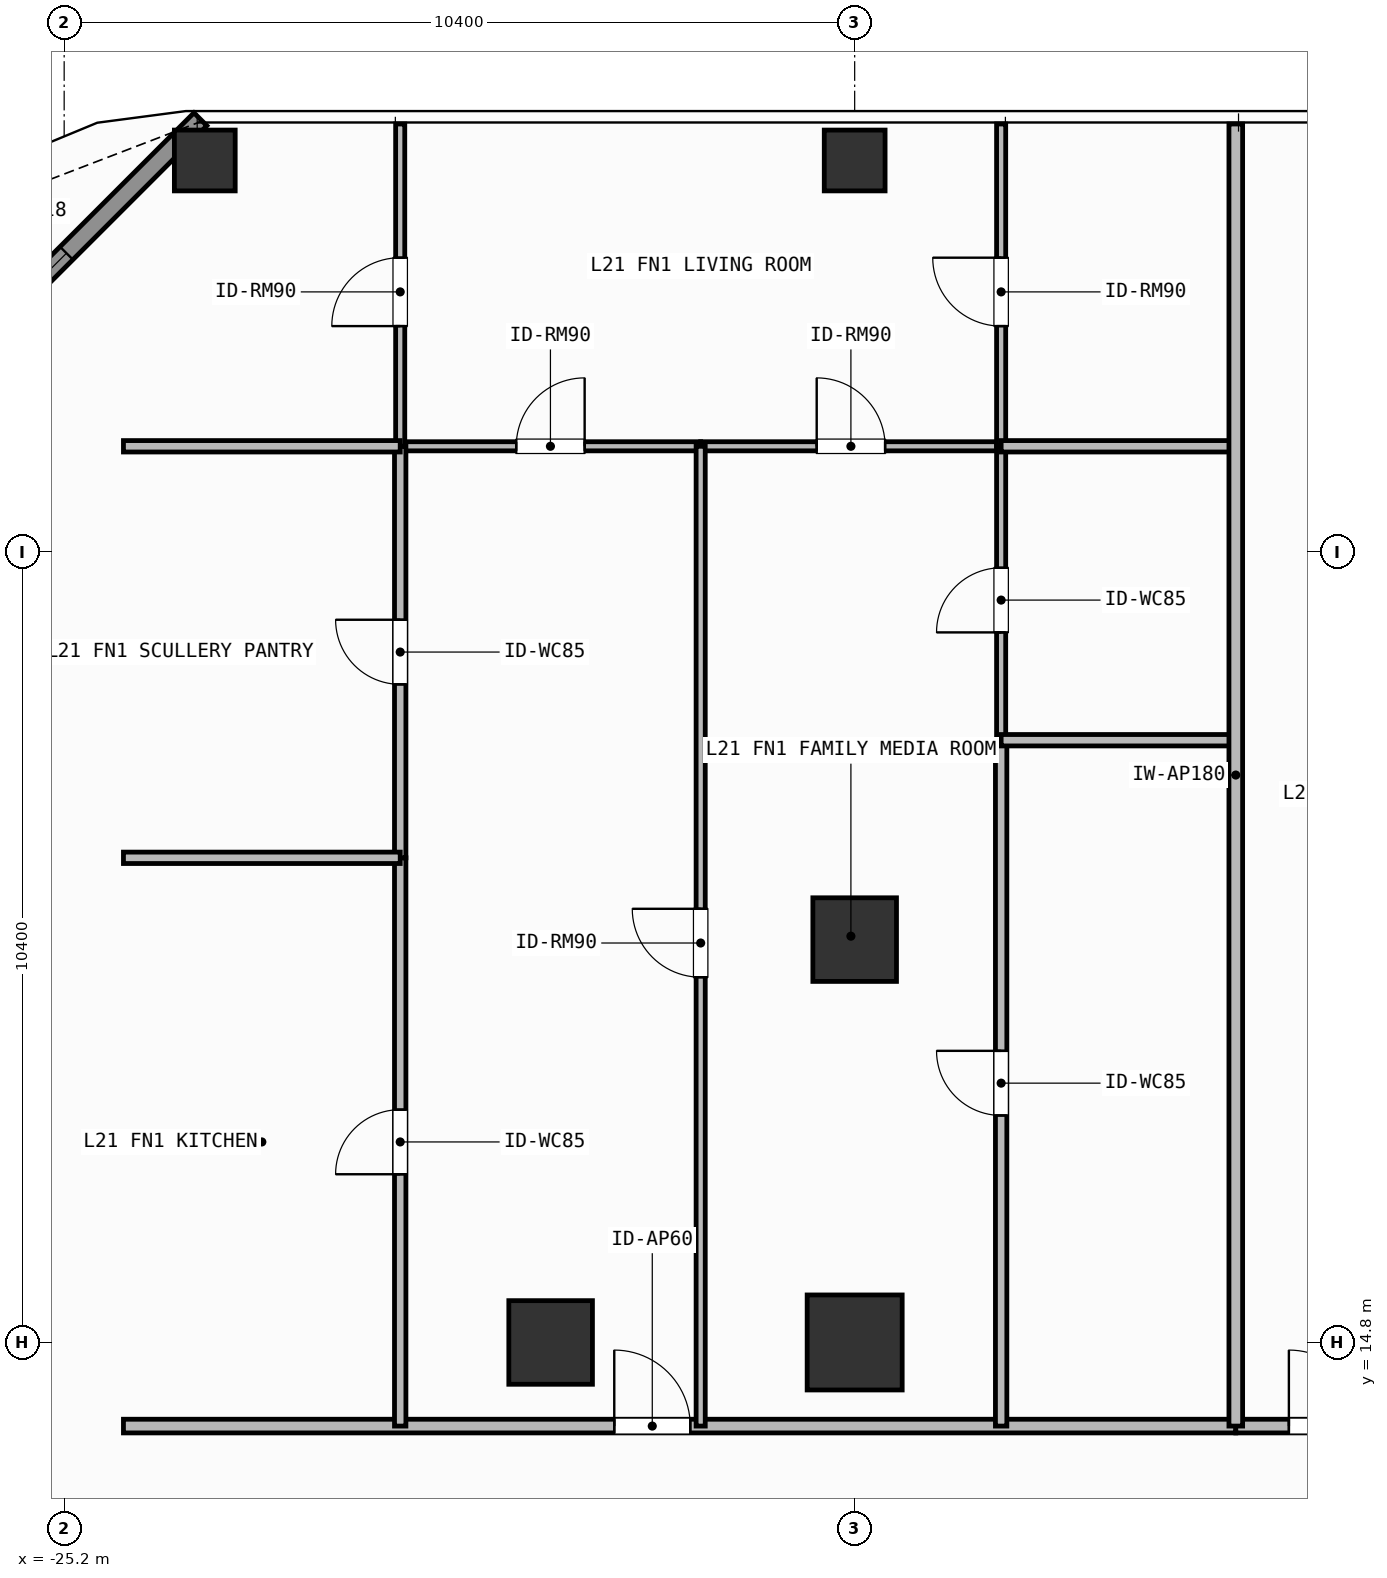
"""IFC4 building model, lengths in metres.
Left out: names, types, materials, properties, quantities, classifications, styles, units other than length and angle.
Written with IfcOpenShell. Run it as: python <this file> out.ifc"""

import sys

from ifc_helpers import new_model, si_unit, direction, frame, frame_2d, origin, origin_2d, place, context, subcontext, project, spatial, rectangle, hollow_rectangle, extrude, element, fill, save


model = new_model("IFC4")
c1 = context("Model", 3, precision=1e-05, world=origin(), true_north=direction((0.0, 1.0)))
c2 = subcontext(c1, "Body", "Model", "MODEL_VIEW")
j1 = project(units=[si_unit("LENGTHUNIT", "METRE"), si_unit("PLANEANGLEUNIT", "RADIAN")], contexts=[c1])
p1 = place(None, origin())
s1 = spatial("IfcSite", under=j1, at=p1, CompositionType="ELEMENT")
p2 = place(p1, origin())
s2 = spatial("IfcBuilding", under=s1, at=p2, CompositionType="ELEMENT")
p3 = place(p2, frame((0.0, 0.0, 85.2)))
s3 = spatial("IfcBuildingStorey", under=s2, at=p3, CompositionType="ELEMENT", Elevation=85.2)
p4 = place(p3, frame((-14.8, 14.8, 0.0), z_axis=(0.0, 0.0, 1.0), x_axis=(1.0, 0.0, 0.0)))
e1 = element("IfcColumn", 1, at=p4, inside=s3, PredefinedType="COLUMN", context=c2, shape_type="SweptSolid", body=[
    extrude(rectangle(XDim=1.25, YDim=1.25, at=origin_2d()), origin(), (0.0, 0.0, 1.0), 3.9),
])
for number, where, z_axis, x_axis in (
    (2, (-18.8, 14.8, 0.0), (0.0, 0.0, 1.0), (1.0, 0.0, 0.0)),
    (3, (-14.8, 20.1, 0.0), (0.0, 0.0, 1.0), (1.0, 0.0, 0.0)),
):
    element("IfcColumn", number, at=place(p3, frame(where, z_axis=z_axis, x_axis=x_axis)), inside=s3, PredefinedType="COLUMN", context=c2, shape_type="SweptSolid", body=[
        extrude(rectangle(XDim=1.1, YDim=1.1, at=origin_2d()), origin(), (0.0, 0.0, 1.0), 3.9),
    ])
for number, where, z_axis, x_axis in (
    (4, (-23.35, 30.35, 0.0), (0.0, 0.0, 1.0), (1.0, 0.0, 0.0)),
    (5, (-14.8, 30.35, 0.0), (0.0, 0.0, 1.0), (1.0, 0.0, 0.0)),
):
    element("IfcColumn", number, at=place(p3, frame(where, z_axis=z_axis, x_axis=x_axis)), inside=s3, PredefinedType="COLUMN", context=c2, shape_type="SweptSolid", body=[
        extrude(hollow_rectangle(XDim=0.8, YDim=0.8, WallThickness=0.036, at=origin_2d()), origin(), (0.0, 0.0, 1.0), 3.9),
    ])
p5 = place(p3, frame((-27.992, 26.308, 0.0), z_axis=(0.0, 0.0, 1.0), x_axis=(0.707106781187, 0.707106781187, 0.0)))
e6 = element("IfcWall", 6, at=p5, inside=s3, PredefinedType="SOLIDWALL", context=c2, shape_type="SweptSolid", body=[
    extrude(rectangle(XDim=6.484, YDim=0.24, at=frame_2d((3.242, 0.0))), origin(), (0.0, 0.0, 1.0), 3.68),
])
p6 = place(p5, frame((2.492, 0.0, 0.8)))
e7 = element("IfcOpeningElement", 7, at=p6, cuts=e6, PredefinedType="OPENING", context=c2, shape_type="SweptSolid", body=[
    extrude(rectangle(XDim=1.5, YDim=1.85, at=frame_2d((0.75, 0.925))), frame((0.0, 0.13, 0.0), z_axis=(0.0, -1.0, 0.0), x_axis=(1.0, 0.0, 0.0)), (0.0, 0.0, 1.0), 0.26),
])
p7 = place(p3, frame((-24.42, 13.7, 0.0), z_axis=(0.0, 0.0, 1.0), x_axis=(1.0, 0.0, 0.0)))
e8 = element("IfcWall", 8, at=p7, inside=s3, PredefinedType="PARTITIONING", context=c2, shape_type="SweptSolid", body=[
    extrude(rectangle(XDim=14.634, YDim=0.18, at=frame_2d((7.317, 0.0))), origin(), (0.0, 0.0, 1.0), 3.68),
])
p8 = place(p7, frame((6.457, 0.0, 0.0)))
e9 = element("IfcOpeningElement", 9, at=p8, cuts=e8, PredefinedType="OPENING", context=c2, shape_type="SweptSolid", body=[
    extrude(rectangle(XDim=1.0, YDim=2.2, at=frame_2d((0.5, 1.1))), frame((0.0, 0.1, 0.0), z_axis=(0.0, -1.0, 0.0), x_axis=(1.0, 0.0, 0.0)), (0.0, 0.0, 1.0), 0.2),
])
p9 = place(p3, frame((-20.779, 26.59, 0.0), z_axis=(0.0, 0.0, 1.0), x_axis=(1.0, 0.0, 0.0)))
e10 = element("IfcWall", 10, at=p9, inside=s3, PredefinedType="PARTITIONING", context=c2, shape_type="SweptSolid", body=[
    extrude(rectangle(XDim=3.953, YDim=0.12, at=frame_2d((1.977, 0.0))), origin(), (0.0, 0.0, 1.0), 3.68),
])
p10 = place(p9, frame((1.527, 0.0, 0.0)))
e11 = element("IfcOpeningElement", 11, at=p10, cuts=e10, PredefinedType="OPENING", context=c2, shape_type="SweptSolid", body=[
    extrude(rectangle(XDim=0.9, YDim=2.1, at=frame_2d((0.45, 1.05))), frame((0.0, 0.07, 0.0), z_axis=(0.0, -1.0, 0.0), x_axis=(1.0, 0.0, 0.0)), (0.0, 0.0, 1.0), 0.14),
])
p11 = place(p3, frame((-16.826, 26.59, 0.0), z_axis=(0.0, 0.0, 1.0), x_axis=(1.0, 0.0, 0.0)))
e12 = element("IfcWall", 12, at=p11, inside=s3, PredefinedType="PARTITIONING", context=c2, shape_type="SweptSolid", body=[
    extrude(rectangle(XDim=3.953, YDim=0.12, at=frame_2d((1.977, 0.0))), origin(), (0.0, 0.0, 1.0), 3.68),
])
p12 = place(p11, frame((1.527, 0.0, 0.0)))
e13 = element("IfcOpeningElement", 13, at=p12, cuts=e12, PredefinedType="OPENING", context=c2, shape_type="SweptSolid", body=[
    extrude(rectangle(XDim=0.9, YDim=2.1, at=frame_2d((0.45, 1.05))), frame((0.0, 0.07, 0.0), z_axis=(0.0, -1.0, 0.0), x_axis=(1.0, 0.0, 0.0)), (0.0, 0.0, 1.0), 0.14),
])
p13 = place(p3, frame((-16.826, 13.7, 0.0), z_axis=(0.0, 0.0, 1.0), x_axis=(0.0, 1.0, 0.0)))
e14 = element("IfcWall", 14, at=p13, inside=s3, PredefinedType="PARTITIONING", context=c2, shape_type="SweptSolid", body=[
    extrude(rectangle(XDim=12.89, YDim=0.12, at=frame_2d((6.445, 0.0))), origin(), (0.0, 0.0, 1.0), 3.68),
])
p14 = place(p13, frame((5.905, 0.0, 0.0)))
e15 = element("IfcOpeningElement", 15, at=p14, cuts=e14, PredefinedType="OPENING", context=c2, shape_type="SweptSolid", body=[
    extrude(rectangle(XDim=0.9, YDim=2.1, at=frame_2d((0.45, 1.05))), frame((0.0, 0.07, 0.0), z_axis=(0.0, -1.0, 0.0), x_axis=(1.0, 0.0, 0.0)), (0.0, 0.0, 1.0), 0.14),
])
p15 = place(p3, frame((-20.779, 13.7, 0.0), z_axis=(0.0, 0.0, 1.0), x_axis=(0.0, 1.0, 0.0)))
e16 = element("IfcWall", 16, at=p15, inside=s3, PredefinedType="PARTITIONING", context=c2, shape_type="SweptSolid", body=[
    extrude(rectangle(XDim=7.476, YDim=0.15, at=frame_2d((3.738, 0.0))), origin(), (0.0, 0.0, 1.0), 3.68),
])
p16 = place(p15, frame((3.313, 0.0, 0.0)))
e17 = element("IfcOpeningElement", 17, at=p16, cuts=e16, PredefinedType="OPENING", context=c2, shape_type="SweptSolid", body=[
    extrude(rectangle(XDim=0.85, YDim=2.1, at=frame_2d((0.425, 1.05))), frame((0.0, 0.085, 0.0), z_axis=(0.0, -1.0, 0.0), x_axis=(1.0, 0.0, 0.0)), (0.0, 0.0, 1.0), 0.17),
])
p17 = place(p3, frame((-20.779, 21.176, 0.0), z_axis=(0.0, 0.0, 1.0), x_axis=(0.0, 1.0, 0.0)))
e18 = element("IfcWall", 18, at=p17, inside=s3, PredefinedType="PARTITIONING", context=c2, shape_type="SweptSolid", body=[
    extrude(rectangle(XDim=5.414, YDim=0.15, at=frame_2d((2.707, 0.0))), origin(), (0.0, 0.0, 1.0), 3.68),
])
p18 = place(p17, frame((2.282, 0.0, 0.0)))
e19 = element("IfcOpeningElement", 19, at=p18, cuts=e18, PredefinedType="OPENING", context=c2, shape_type="SweptSolid", body=[
    extrude(rectangle(XDim=0.85, YDim=2.1, at=frame_2d((0.425, 1.05))), frame((0.0, 0.085, 0.0), z_axis=(0.0, -1.0, 0.0), x_axis=(1.0, 0.0, 0.0)), (0.0, 0.0, 1.0), 0.17),
])
p19 = place(p3, frame((-20.779, 26.59, 0.0), z_axis=(0.0, 0.0, 1.0), x_axis=(0.0, 1.0, 0.0)))
e20 = element("IfcWall", 20, at=p19, inside=s3, PredefinedType="PARTITIONING", context=c2, shape_type="SweptSolid", body=[
    extrude(rectangle(XDim=4.24, YDim=0.12, at=frame_2d((2.12, 0.0))), origin(), (0.0, 0.0, 1.0), 3.68),
])
p20 = place(p19, frame((1.581, 0.0, 0.0)))
e21 = element("IfcOpeningElement", 21, at=p20, cuts=e20, PredefinedType="OPENING", context=c2, shape_type="SweptSolid", body=[
    extrude(rectangle(XDim=0.9, YDim=2.1, at=frame_2d((0.45, 1.05))), frame((0.0, 0.07, 0.0), z_axis=(0.0, -1.0, 0.0), x_axis=(1.0, 0.0, 0.0)), (0.0, 0.0, 1.0), 0.14),
])
p21 = place(p3, frame((-12.873, 13.7, 0.0), z_axis=(0.0, 0.0, 1.0), x_axis=(0.0, 1.0, 0.0)))
e22 = element("IfcWall", 22, at=p21, inside=s3, PredefinedType="PARTITIONING", context=c2, shape_type="SweptSolid", body=[
    extrude(rectangle(XDim=9.023, YDim=0.15, at=frame_2d((4.511, 0.0))), origin(), (0.0, 0.0, 1.0), 3.68),
])
p22 = place(p21, frame((4.086, 0.0, 0.0)))
e23 = element("IfcOpeningElement", 23, at=p22, cuts=e22, PredefinedType="OPENING", context=c2, shape_type="SweptSolid", body=[
    extrude(rectangle(XDim=0.85, YDim=2.1, at=frame_2d((0.425, 1.05))), frame((0.0, 0.085, 0.0), z_axis=(0.0, -1.0, 0.0), x_axis=(1.0, 0.0, 0.0)), (0.0, 0.0, 1.0), 0.17),
])
p23 = place(p3, frame((-12.873, 22.723, 0.0), z_axis=(0.0, 0.0, 1.0), x_axis=(0.0, 1.0, 0.0)))
e24 = element("IfcWall", 24, at=p23, inside=s3, PredefinedType="PARTITIONING", context=c2, shape_type="SweptSolid", body=[
    extrude(rectangle(XDim=3.867, YDim=0.12, at=frame_2d((1.934, 0.0))), origin(), (0.0, 0.0, 1.0), 3.68),
])
p24 = place(p23, frame((1.419, 0.0, 0.0)))
e25 = element("IfcOpeningElement", 25, at=p24, cuts=e24, PredefinedType="OPENING", context=c2, shape_type="SweptSolid", body=[
    extrude(rectangle(XDim=0.85, YDim=2.1, at=frame_2d((0.425, 1.05))), frame((0.0, 0.07, 0.0), z_axis=(0.0, -1.0, 0.0), x_axis=(1.0, 0.0, 0.0)), (0.0, 0.0, 1.0), 0.14),
])
p25 = place(p3, frame((-12.873, 26.59, 0.0), z_axis=(0.0, 0.0, 1.0), x_axis=(0.0, 1.0, 0.0)))
e26 = element("IfcWall", 26, at=p25, inside=s3, PredefinedType="PARTITIONING", context=c2, shape_type="SweptSolid", body=[
    extrude(rectangle(XDim=4.24, YDim=0.12, at=frame_2d((2.12, 0.0))), origin(), (0.0, 0.0, 1.0), 3.68),
])
p26 = place(p25, frame((1.581, 0.0, 0.0)))
e27 = element("IfcOpeningElement", 27, at=p26, cuts=e26, PredefinedType="OPENING", context=c2, shape_type="SweptSolid", body=[
    extrude(rectangle(XDim=0.9, YDim=2.1, at=frame_2d((0.45, 1.05))), frame((0.0, 0.07, 0.0), z_axis=(0.0, -1.0, 0.0), x_axis=(1.0, 0.0, 0.0)), (0.0, 0.0, 1.0), 0.14),
])
p27 = place(p3, frame((-9.786, 13.7, 0.0), z_axis=(0.0, 0.0, 1.0), x_axis=(1.0, 0.0, 0.0)))
e28 = element("IfcWall", 28, at=p27, inside=s3, PredefinedType="PARTITIONING", context=c2, shape_type="SweptSolid", body=[
    extrude(rectangle(XDim=6.886, YDim=0.18, at=frame_2d((3.443, 0.0))), origin(), (0.0, 0.0, 1.0), 3.68),
])
p28 = place(p27, frame((0.698, 0.0, 0.0)))
e29 = element("IfcOpeningElement", 29, at=p28, cuts=e28, PredefinedType="OPENING", context=c2, shape_type="SweptSolid", body=[
    extrude(rectangle(XDim=1.0, YDim=2.2, at=frame_2d((0.5, 1.1))), frame((0.0, 0.1, 0.0), z_axis=(0.0, -1.0, 0.0), x_axis=(1.0, 0.0, 0.0)), (0.0, 0.0, 1.0), 0.2),
])
for number, where, z_axis, x_axis in (
    (30, (-24.42, 21.176, 0.0), (0.0, 0.0, 1.0), (1.0, 0.0, 0.0)),
    (31, (-24.42, 26.59, 0.0), (0.0, 0.0, 1.0), (1.0, 0.0, 0.0)),
):
    element("IfcWall", number, at=place(p3, frame(where, z_axis=z_axis, x_axis=x_axis)), inside=s3, PredefinedType="PARTITIONING", context=c2, shape_type="SweptSolid", body=[
        extrude(rectangle(XDim=3.641, YDim=0.15, at=frame_2d((1.82, 0.0))), origin(), (0.0, 0.0, 1.0), 3.68),
    ])
for number, where, z_axis, x_axis in (
    (32, (-12.873, 22.723, 0.0), (0.0, 0.0, 1.0), (1.0, 0.0, 0.0)),
    (33, (-12.873, 26.59, 0.0), (0.0, 0.0, 1.0), (1.0, 0.0, 0.0)),
):
    element("IfcWall", number, at=place(p3, frame(where, z_axis=z_axis, x_axis=x_axis)), inside=s3, PredefinedType="PARTITIONING", context=c2, shape_type="SweptSolid", body=[
        extrude(rectangle(XDim=3.087, YDim=0.15, at=frame_2d((1.543, 0.0))), origin(), (0.0, 0.0, 1.0), 3.68),
    ])
p29 = place(p3, frame((-9.786, 13.7, 0.0), z_axis=(0.0, 0.0, 1.0), x_axis=(0.0, 1.0, 0.0)))
e34 = element("IfcWall", 34, at=p29, inside=s3, PredefinedType="PARTITIONING", context=c2, shape_type="SweptSolid", body=[
    extrude(rectangle(XDim=17.13, YDim=0.18, at=frame_2d((8.565, 0.0))), origin(), (0.0, 0.0, 1.0), 3.68),
])
p30 = place(p6, origin())
e35 = element("IfcWindow", 35, at=p30, inside=s3, PartitioningType="SINGLE_PANEL", PredefinedType="WINDOW", context=c2, shape_type="SweptSolid", body=[
    extrude(rectangle(XDim=1.5, YDim=1.85, at=frame_2d((0.75, 0.925))), frame((0.0, 0.03, 0.0), z_axis=(0.0, -1.0, 0.0), x_axis=(1.0, 0.0, 0.0)), (0.0, 0.0, 1.0), 0.06),
])
fill(e7, e35)
p31 = place(p8, origin())
e36 = element("IfcDoor", 36, at=p31, inside=s3, OperationType="SINGLE_SWING_LEFT", PredefinedType="DOOR", context=c2, shape_type="SweptSolid", body=[
    extrude(rectangle(XDim=1.0, YDim=2.2, at=frame_2d((0.5, 1.1))), frame((0.0, 0.025, 0.0), z_axis=(0.0, -1.0, 0.0), x_axis=(1.0, 0.0, 0.0)), (0.0, 0.0, 1.0), 0.05),
])
fill(e9, e36)
p32 = place(p10, origin())
e37 = element("IfcDoor", 37, at=p32, inside=s3, OperationType="SINGLE_SWING_RIGHT", PredefinedType="DOOR", context=c2, shape_type="SweptSolid", body=[
    extrude(rectangle(XDim=0.9, YDim=2.1, at=frame_2d((0.45, 1.05))), frame((0.0, 0.025, 0.0), z_axis=(0.0, -1.0, 0.0), x_axis=(1.0, 0.0, 0.0)), (0.0, 0.0, 1.0), 0.05),
])
fill(e11, e37)
p33 = place(p12, origin())
e38 = element("IfcDoor", 38, at=p33, inside=s3, OperationType="SINGLE_SWING_LEFT", PredefinedType="DOOR", context=c2, shape_type="SweptSolid", body=[
    extrude(rectangle(XDim=0.9, YDim=2.1, at=frame_2d((0.45, 1.05))), frame((0.0, 0.025, 0.0), z_axis=(0.0, -1.0, 0.0), x_axis=(1.0, 0.0, 0.0)), (0.0, 0.0, 1.0), 0.05),
])
fill(e13, e38)
p34 = place(p14, origin())
e39 = element("IfcDoor", 39, at=p34, inside=s3, OperationType="SINGLE_SWING_RIGHT", PredefinedType="DOOR", context=c2, shape_type="SweptSolid", body=[
    extrude(rectangle(XDim=0.9, YDim=2.1, at=frame_2d((0.45, 1.05))), frame((0.0, 0.025, 0.0), z_axis=(0.0, -1.0, 0.0), x_axis=(1.0, 0.0, 0.0)), (0.0, 0.0, 1.0), 0.05),
])
fill(e15, e39)
p35 = place(p16, origin())
e40 = element("IfcDoor", 40, at=p35, inside=s3, OperationType="SINGLE_SWING_LEFT", PredefinedType="DOOR", context=c2, shape_type="SweptSolid", body=[
    extrude(rectangle(XDim=0.85, YDim=2.1, at=frame_2d((0.425, 1.05))), frame((0.0, 0.025, 0.0), z_axis=(0.0, -1.0, 0.0), x_axis=(1.0, 0.0, 0.0)), (0.0, 0.0, 1.0), 0.05),
])
fill(e17, e40)
p36 = place(p18, origin())
e41 = element("IfcDoor", 41, at=p36, inside=s3, OperationType="SINGLE_SWING_RIGHT", PredefinedType="DOOR", context=c2, shape_type="SweptSolid", body=[
    extrude(rectangle(XDim=0.85, YDim=2.1, at=frame_2d((0.425, 1.05))), frame((0.0, 0.025, 0.0), z_axis=(0.0, -1.0, 0.0), x_axis=(1.0, 0.0, 0.0)), (0.0, 0.0, 1.0), 0.05),
])
fill(e19, e41)
p37 = place(p20, origin())
e42 = element("IfcDoor", 42, at=p37, inside=s3, OperationType="SINGLE_SWING_LEFT", PredefinedType="DOOR", context=c2, shape_type="SweptSolid", body=[
    extrude(rectangle(XDim=0.9, YDim=2.1, at=frame_2d((0.45, 1.05))), frame((0.0, 0.025, 0.0), z_axis=(0.0, -1.0, 0.0), x_axis=(1.0, 0.0, 0.0)), (0.0, 0.0, 1.0), 0.05),
])
fill(e21, e42)
p38 = place(p22, origin())
e43 = element("IfcDoor", 43, at=p38, inside=s3, OperationType="SINGLE_SWING_RIGHT", PredefinedType="DOOR", context=c2, shape_type="SweptSolid", body=[
    extrude(rectangle(XDim=0.85, YDim=2.1, at=frame_2d((0.425, 1.05))), frame((0.0, 0.025, 0.0), z_axis=(0.0, -1.0, 0.0), x_axis=(1.0, 0.0, 0.0)), (0.0, 0.0, 1.0), 0.05),
])
fill(e23, e43)
p39 = place(p24, origin())
e44 = element("IfcDoor", 44, at=p39, inside=s3, OperationType="SINGLE_SWING_LEFT", PredefinedType="DOOR", context=c2, shape_type="SweptSolid", body=[
    extrude(rectangle(XDim=0.85, YDim=2.1, at=frame_2d((0.425, 1.05))), frame((0.0, 0.025, 0.0), z_axis=(0.0, -1.0, 0.0), x_axis=(1.0, 0.0, 0.0)), (0.0, 0.0, 1.0), 0.05),
])
fill(e25, e44)
p40 = place(p26, origin())
e45 = element("IfcDoor", 45, at=p40, inside=s3, OperationType="SINGLE_SWING_RIGHT", PredefinedType="DOOR", context=c2, shape_type="SweptSolid", body=[
    extrude(rectangle(XDim=0.9, YDim=2.1, at=frame_2d((0.45, 1.05))), frame((0.0, 0.025, 0.0), z_axis=(0.0, -1.0, 0.0), x_axis=(1.0, 0.0, 0.0)), (0.0, 0.0, 1.0), 0.05),
])
fill(e27, e45)
p41 = place(p28, origin())
e46 = element("IfcDoor", 46, at=p41, inside=s3, OperationType="SINGLE_SWING_LEFT", PredefinedType="DOOR", context=c2, shape_type="SweptSolid", body=[
    extrude(rectangle(XDim=1.0, YDim=2.2, at=frame_2d((0.5, 1.1))), frame((0.0, 0.025, 0.0), z_axis=(0.0, -1.0, 0.0), x_axis=(1.0, 0.0, 0.0)), (0.0, 0.0, 1.0), 0.05),
])
fill(e29, e46)
save(model, sys.argv[1])
